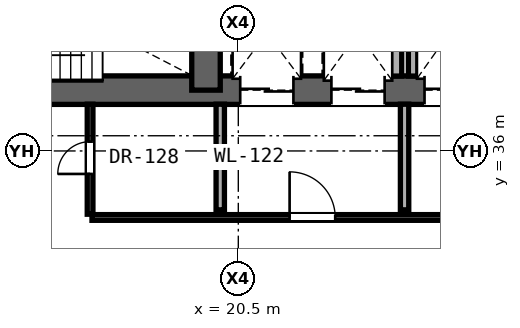
"""IFC4 building model, lengths in metres.
Left out: names, types, materials, properties, quantities, classifications, styles, units other than length and angle.
Written with IfcOpenShell. Run it as: python <this file> out.ifc"""

import sys

from ifc_helpers import new_model, si_unit, direction, frame, frame_2d, origin, place, context, subcontext, project, spatial, rectangle, extrude, element, fill, save


model = new_model("IFC4")
c1 = context("Model", 3, precision=1e-05, world=origin(), true_north=direction((0.0, 1.0)))
c2 = subcontext(c1, "Body", "Model", "MODEL_VIEW")
j1 = project(units=[si_unit("LENGTHUNIT", "METRE"), si_unit("PLANEANGLEUNIT", "RADIAN")], contexts=[c1])
p1 = place(None, origin())
s1 = spatial("IfcSite", under=j1, at=p1, CompositionType="ELEMENT")
p2 = place(p1, origin())
s2 = spatial("IfcBuilding", under=s1, at=p2, CompositionType="ELEMENT")
p3 = place(p2, frame((0.0, 0.0, 18.1)))
s3 = spatial("IfcBuildingStorey", under=s2, at=p3, CompositionType="ELEMENT", Elevation=18.1)
p4 = place(p3, frame((11.0, 37.6, 0.0), z_axis=(0.0, 0.0, 1.0), x_axis=(1.0, 0.0, 0.0)))
e1 = element("IfcWall", 1, at=p4, inside=s3, PredefinedType="SHEAR", context=c2, shape_type="SweptSolid", body=[
    extrude(rectangle(XDim=19.0, YDim=0.75, at=frame_2d((9.5, 0.0))), origin(), (0.0, 0.0, 1.0), 3.65),
])
p5 = place(p4, frame((1.07, 0.0, 0.0)))
e2 = element("IfcOpeningElement", 2, at=p5, cuts=e1, PredefinedType="OPENING", context=c2, shape_type="SweptSolid", body=[
    extrude(rectangle(XDim=1.15, YDim=2.2, at=frame_2d((0.575, 1.1))), frame((0.0, 0.385, 0.0), z_axis=(0.0, -1.0, 0.0), x_axis=(1.0, 0.0, 0.0)), (0.0, 0.0, 1.0), 0.77),
])
p6 = place(p4, frame((9.55, 0.0, 0.0)))
e3 = element("IfcOpeningElement", 3, at=p6, cuts=e1, PredefinedType="OPENING", context=c2, shape_type="SweptSolid", body=[
    extrude(rectangle(XDim=1.4, YDim=2.35, at=frame_2d((0.7, 1.175))), frame((0.0, 0.385, 0.0), z_axis=(0.0, -1.0, 0.0), x_axis=(1.0, 0.0, 0.0)), (0.0, 0.0, 1.0), 0.77),
])
p7 = place(p4, frame((11.95, 0.0, 0.0)))
e4 = element("IfcOpeningElement", 4, at=p7, cuts=e1, PredefinedType="OPENING", context=c2, shape_type="SweptSolid", body=[
    extrude(rectangle(XDim=1.4, YDim=2.35, at=frame_2d((0.7, 1.175))), frame((0.0, 0.385, 0.0), z_axis=(0.0, -1.0, 0.0), x_axis=(1.0, 0.0, 0.0)), (0.0, 0.0, 1.0), 0.77),
])
p8 = place(p4, frame((14.4, 0.0, 0.0)))
e5 = element("IfcOpeningElement", 5, at=p8, cuts=e1, PredefinedType="OPENING", context=c2, shape_type="SweptSolid", body=[
    extrude(rectangle(XDim=1.3, YDim=2.3, at=frame_2d((0.65, 1.15))), frame((0.0, 0.385, 0.0), z_axis=(0.0, -1.0, 0.0), x_axis=(1.0, 0.0, 0.0)), (0.0, 0.0, 1.0), 0.77),
])
p9 = place(p4, frame((16.6, 0.0, 0.0)))
e6 = element("IfcOpeningElement", 6, at=p9, cuts=e1, PredefinedType="OPENING", context=c2, shape_type="SweptSolid", body=[
    extrude(rectangle(XDim=1.3, YDim=2.3, at=frame_2d((0.65, 1.15))), frame((0.0, 0.385, 0.0), z_axis=(0.0, -1.0, 0.0), x_axis=(1.0, 0.0, 0.0)), (0.0, 0.0, 1.0), 0.77),
])
p10 = place(p3, frame((19.65, 37.6, 0.0), z_axis=(0.0, 0.0, 1.0), x_axis=(0.0, 1.0, 0.0)))
e7 = element("IfcWall", 7, at=p10, inside=s3, PredefinedType="SHEAR", context=c2, shape_type="SweptSolid", body=[
    extrude(rectangle(XDim=3.543, YDim=0.75, at=frame_2d((1.771, 0.0))), origin(), (0.0, 0.0, 1.0), 3.65),
])
p11 = place(p3, frame((16.65, 34.25, 0.0), z_axis=(0.0, 0.0, 1.0), x_axis=(1.0, 0.0, 0.0)))
e8 = element("IfcWall", 8, at=p11, inside=s3, PredefinedType="PARTITIONING", context=c2, shape_type="SweptSolid", body=[
    extrude(rectangle(XDim=23.73, YDim=0.15, at=frame_2d((11.865, 0.0))), origin(), (0.0, 0.0, 1.0), 2.602),
])
p12 = place(p11, frame((5.2, 0.0, 0.0)))
e9 = element("IfcOpeningElement", 9, at=p12, cuts=e8, PredefinedType="OPENING", context=c2, shape_type="SweptSolid", body=[
    extrude(rectangle(XDim=1.2, YDim=2.25, at=frame_2d((0.6, 1.125))), frame((0.0, 0.085, 0.0), z_axis=(0.0, -1.0, 0.0), x_axis=(1.0, 0.0, 0.0)), (0.0, 0.0, 1.0), 0.17),
])
p13 = place(p11, frame((9.9, 0.0, 0.0)))
e10 = element("IfcOpeningElement", 10, at=p13, cuts=e8, PredefinedType="OPENING", context=c2, shape_type="SweptSolid", body=[
    extrude(rectangle(XDim=1.2, YDim=2.25, at=frame_2d((0.6, 1.125))), frame((0.0, 0.085, 0.0), z_axis=(0.0, -1.0, 0.0), x_axis=(1.0, 0.0, 0.0)), (0.0, 0.0, 1.0), 0.17),
])
p14 = place(p3, frame((16.6, 34.335, 0.0), z_axis=(0.0, 0.0, 1.0), x_axis=(0.0, 1.0, 0.0)))
e11 = element("IfcWall", 11, at=p14, inside=s3, PredefinedType="PARTITIONING", context=c2, shape_type="SweptSolid", body=[
    extrude(rectangle(XDim=2.895, YDim=0.15, at=frame_2d((1.448, 0.0))), origin(), (0.0, 0.0, 1.0), 3.65),
])
p15 = place(p14, frame((1.06, 0.0, 0.0)))
e12 = element("IfcOpeningElement", 12, at=p15, cuts=e11, PredefinedType="OPENING", context=c2, shape_type="SweptSolid", body=[
    extrude(rectangle(XDim=0.85, YDim=2.01, at=frame_2d((0.425, 1.005))), frame((0.0, 0.085, 0.0), z_axis=(0.0, -1.0, 0.0), x_axis=(1.0, 0.0, 0.0)), (0.0, 0.0, 1.0), 0.17),
])
p16 = place(p3, frame((20.025, 34.45, 0.0), z_axis=(0.0, 0.0, 1.0), x_axis=(0.0, 1.0, 0.0)))
e13 = element("IfcWall", 13, at=p16, inside=s3, PredefinedType="SOLIDWALL", context=c2, shape_type="SweptSolid", body=[
    extrude(rectangle(XDim=2.78, YDim=0.22, at=frame_2d((1.39, 0.0))), origin(), (0.0, 0.0, 1.0), 3.65),
])
p17 = place(p3, frame((24.65, 37.97, 0.0), z_axis=(0.0, 0.0, 1.0), x_axis=(0.0, 1.0, 0.0)))
e14 = element("IfcWall", 14, at=p17, inside=s3, PredefinedType="SOLIDWALL", context=c2, shape_type="SweptSolid", body=[
    extrude(rectangle(XDim=2.27, YDim=0.3, at=frame_2d((1.135, 0.0))), origin(), (0.0, 0.0, 1.0), 3.65),
])
p18 = place(p3, frame((24.875, 34.45, 0.0), z_axis=(0.0, 0.0, 1.0), x_axis=(0.0, 1.0, 0.0)))
e15 = element("IfcWall", 15, at=p18, inside=s3, PredefinedType="SOLIDWALL", context=c2, shape_type="SweptSolid", body=[
    extrude(rectangle(XDim=2.78, YDim=0.22, at=frame_2d((1.39, 0.0))), origin(), (0.0, 0.0, 1.0), 3.65),
])
p19 = place(p3, frame((25.1, 37.97, 0.0), z_axis=(0.0, 0.0, 1.0), x_axis=(0.0, 1.0, 0.0)))
e16 = element("IfcWall", 16, at=p19, inside=s3, PredefinedType="SOLIDWALL", context=c2, shape_type="SweptSolid", body=[
    extrude(rectangle(XDim=2.245, YDim=0.25, at=frame_2d((1.123, 0.0))), origin(), (0.0, 0.0, 1.0), 3.65),
])
p20 = place(p12, origin())
e17 = element("IfcDoor", 17, at=p20, inside=s3, OperationType="SINGLE_SWING_LEFT", PredefinedType="DOOR", context=c2, shape_type="SweptSolid", body=[
    extrude(rectangle(XDim=1.2, YDim=2.25, at=frame_2d((0.6, 1.125))), frame((0.0, 0.025, 0.0), z_axis=(0.0, -1.0, 0.0), x_axis=(1.0, 0.0, 0.0)), (0.0, 0.0, 1.0), 0.05),
])
fill(e9, e17)
p21 = place(p15, origin())
e18 = element("IfcDoor", 18, at=p21, inside=s3, OperationType="SINGLE_SWING_LEFT", PredefinedType="DOOR", context=c2, shape_type="SweptSolid", body=[
    extrude(rectangle(XDim=0.85, YDim=2.01, at=frame_2d((0.425, 1.005))), frame((0.0, 0.025, 0.0), z_axis=(0.0, -1.0, 0.0), x_axis=(1.0, 0.0, 0.0)), (0.0, 0.0, 1.0), 0.05),
])
fill(e12, e18)
p22 = place(p6, origin())
e19 = element("IfcDoor", 19, at=p22, inside=s3, OperationType="DOUBLE_DOOR_SLIDING", PredefinedType="DOOR", context=c2, shape_type="SweptSolid", body=[
    extrude(rectangle(XDim=1.4, YDim=2.35, at=frame_2d((0.7, 1.175))), frame((0.0, 0.025, 0.0), z_axis=(0.0, -1.0, 0.0), x_axis=(1.0, 0.0, 0.0)), (0.0, 0.0, 1.0), 0.05),
])
fill(e3, e19)
p23 = place(p7, origin())
e20 = element("IfcDoor", 20, at=p23, inside=s3, OperationType="DOUBLE_DOOR_SLIDING", PredefinedType="DOOR", context=c2, shape_type="SweptSolid", body=[
    extrude(rectangle(XDim=1.4, YDim=2.35, at=frame_2d((0.7, 1.175))), frame((0.0, 0.025, 0.0), z_axis=(0.0, -1.0, 0.0), x_axis=(1.0, 0.0, 0.0)), (0.0, 0.0, 1.0), 0.05),
])
fill(e4, e20)
p24 = place(p8, origin())
e21 = element("IfcDoor", 21, at=p24, inside=s3, OperationType="DOUBLE_DOOR_SLIDING", PredefinedType="DOOR", context=c2, shape_type="SweptSolid", body=[
    extrude(rectangle(XDim=1.3, YDim=2.3, at=frame_2d((0.65, 1.15))), frame((0.0, 0.025, 0.0), z_axis=(0.0, -1.0, 0.0), x_axis=(1.0, 0.0, 0.0)), (0.0, 0.0, 1.0), 0.05),
])
fill(e5, e21)
save(model, sys.argv[1])
